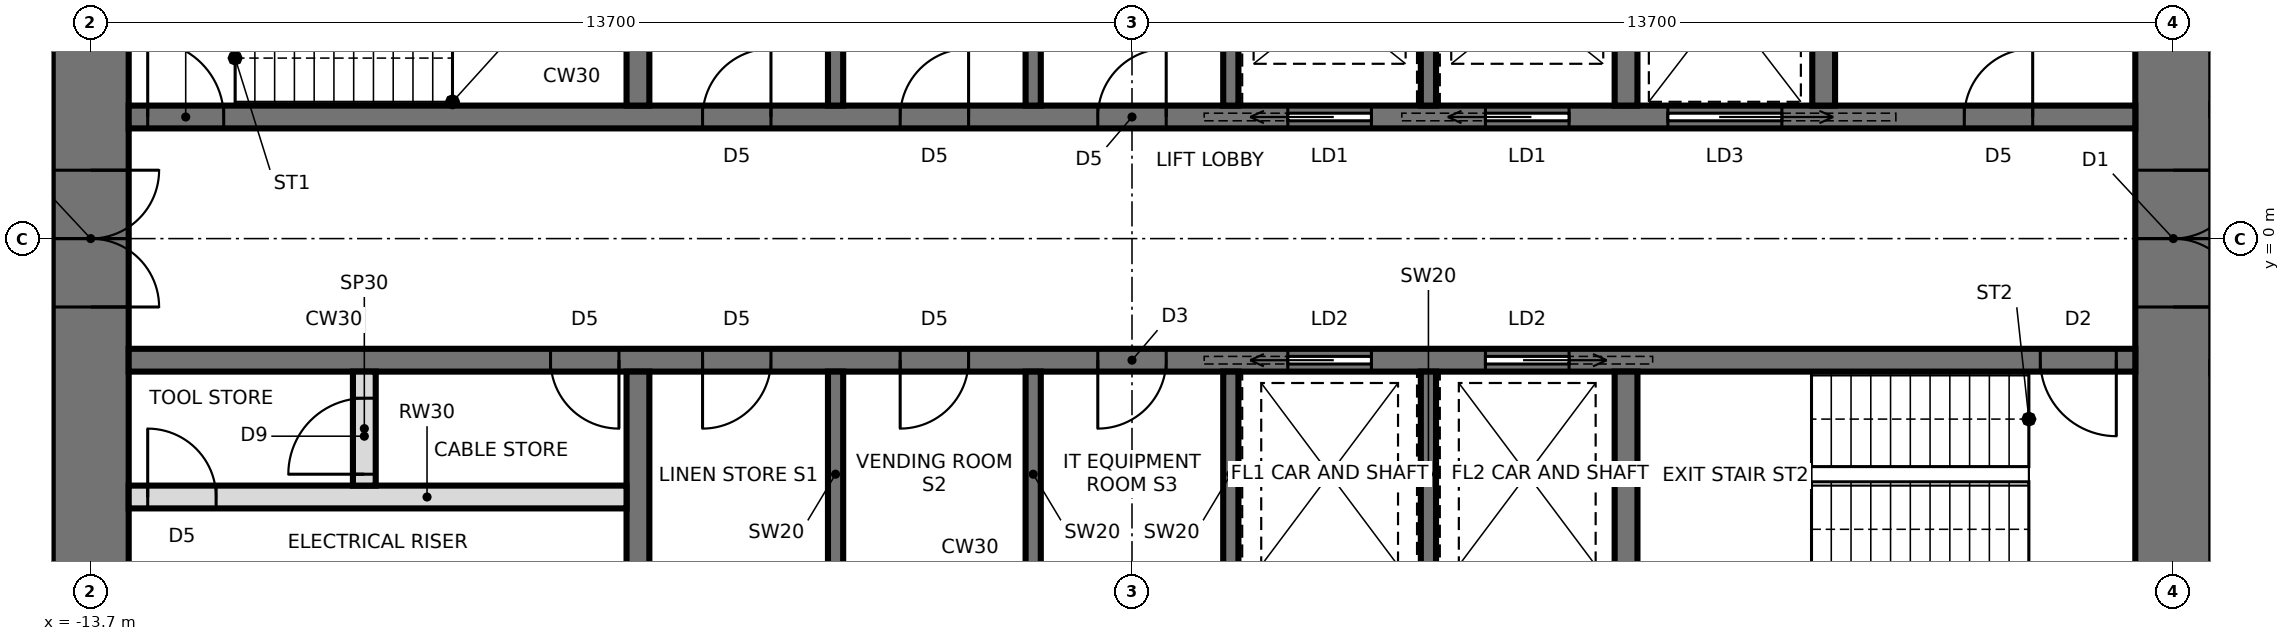
"""IFC4 building model, lengths in metres.
Left out: names, types, materials, properties, quantities, classifications, styles, units other than length and angle.
Written with IfcOpenShell. Run it as: python <this file> out.ifc"""

import sys

from ifc_helpers import new_model, si_unit, direction, frame, frame_2d, origin, place, context, subcontext, project, spatial, rectangle, extrude, element, fill, save


model = new_model("IFC4")
c1 = context("Model", 3, precision=1e-05, world=origin(), true_north=direction((0.0, 1.0)))
c2 = subcontext(c1, "Body", "Model", "MODEL_VIEW")
j1 = project(units=[si_unit("LENGTHUNIT", "METRE"), si_unit("PLANEANGLEUNIT", "RADIAN")], contexts=[c1])
p1 = place(None, origin())
s1 = spatial("IfcSite", under=j1, at=p1, CompositionType="ELEMENT")
p2 = place(p1, origin())
s2 = spatial("IfcBuilding", under=s1, at=p2, CompositionType="ELEMENT")
p3 = place(p2, frame((0.0, 0.0, 256.0)))
s3 = spatial("IfcBuildingStorey", under=s2, at=p3, CompositionType="ELEMENT", Elevation=256.0)
p4 = place(p3, frame((13.7, -9.5, 0.0), z_axis=(0.0, 0.0, 1.0), x_axis=(0.0, 1.0, 0.0)))
e1 = element("IfcWall", 1, at=p4, inside=s3, PredefinedType="SHEAR", context=c2, shape_type="SweptSolid", body=[
    extrude(rectangle(XDim=19.0, YDim=1.0, at=frame_2d((9.5, 0.0))), origin(), (0.0, 0.0, 1.0), 4.2),
])
p5 = place(p4, frame((8.6, 0.0, 0.0)))
e2 = element("IfcOpeningElement", 2, at=p5, cuts=e1, PredefinedType="OPENING", context=c2, shape_type="SweptSolid", body=[
    extrude(rectangle(XDim=1.8, YDim=2.4, at=frame_2d((0.9, 1.2))), frame((0.0, 0.51, 0.0), z_axis=(0.0, -1.0, 0.0), x_axis=(1.0, 0.0, 0.0)), (0.0, 0.0, 1.0), 1.02),
])
p6 = place(p3, frame((-13.7, 9.5, 0.0), z_axis=(0.0, 0.0, 1.0), x_axis=(0.0, -1.0, 0.0)))
e3 = element("IfcWall", 3, at=p6, inside=s3, PredefinedType="SHEAR", context=c2, shape_type="SweptSolid", body=[
    extrude(rectangle(XDim=19.0, YDim=1.0, at=frame_2d((9.5, 0.0))), origin(), (0.0, 0.0, 1.0), 4.2),
])
p7 = place(p6, frame((8.6, 0.0, 0.0)))
e4 = element("IfcOpeningElement", 4, at=p7, cuts=e3, PredefinedType="OPENING", context=c2, shape_type="SweptSolid", body=[
    extrude(rectangle(XDim=1.8, YDim=2.4, at=frame_2d((0.9, 1.2))), frame((0.0, 0.51, 0.0), z_axis=(0.0, -1.0, 0.0), x_axis=(1.0, 0.0, 0.0)), (0.0, 0.0, 1.0), 1.02),
])
p8 = place(p3, frame((-13.2, 1.6, 0.0), z_axis=(0.0, 0.0, 1.0), x_axis=(1.0, 0.0, 0.0)))
e5 = element("IfcWall", 5, at=p8, inside=s3, PredefinedType="SHEAR", context=c2, shape_type="SweptSolid", body=[
    extrude(rectangle(XDim=26.4, YDim=0.3, at=frame_2d((13.2, 0.0))), origin(), (0.0, 0.0, 1.0), 4.2),
])
p9 = place(p8, frame((0.25, 0.0, 0.0)))
e6 = element("IfcOpeningElement", 6, at=p9, cuts=e5, PredefinedType="OPENING", context=c2, shape_type="SweptSolid", body=[
    extrude(rectangle(XDim=1.0, YDim=2.1, at=frame_2d((0.5, 1.05))), frame((0.0, 0.16, 0.0), z_axis=(0.0, -1.0, 0.0), x_axis=(1.0, 0.0, 0.0)), (0.0, 0.0, 1.0), 0.32),
])
p10 = place(p8, frame((20.25, 0.0, 0.0)))
e7 = element("IfcOpeningElement", 7, at=p10, cuts=e5, PredefinedType="OPENING", context=c2, shape_type="SweptSolid", body=[
    extrude(rectangle(XDim=1.5, YDim=2.4, at=frame_2d((0.75, 1.2))), frame((0.0, 0.16, 0.0), z_axis=(0.0, -1.0, 0.0), x_axis=(1.0, 0.0, 0.0)), (0.0, 0.0, 1.0), 0.32),
])
p11 = place(p8, frame((7.55, 0.0, 0.0)))
e8 = element("IfcOpeningElement", 8, at=p11, cuts=e5, PredefinedType="OPENING", context=c2, shape_type="SweptSolid", body=[
    extrude(rectangle(XDim=0.9, YDim=2.1, at=frame_2d((0.45, 1.05))), frame((0.0, 0.16, 0.0), z_axis=(0.0, -1.0, 0.0), x_axis=(1.0, 0.0, 0.0)), (0.0, 0.0, 1.0), 0.32),
])
p12 = place(p8, frame((10.15, 0.0, 0.0)))
e9 = element("IfcOpeningElement", 9, at=p12, cuts=e5, PredefinedType="OPENING", context=c2, shape_type="SweptSolid", body=[
    extrude(rectangle(XDim=0.9, YDim=2.1, at=frame_2d((0.45, 1.05))), frame((0.0, 0.16, 0.0), z_axis=(0.0, -1.0, 0.0), x_axis=(1.0, 0.0, 0.0)), (0.0, 0.0, 1.0), 0.32),
])
p13 = place(p8, frame((12.75, 0.0, 0.0)))
e10 = element("IfcOpeningElement", 10, at=p13, cuts=e5, PredefinedType="OPENING", context=c2, shape_type="SweptSolid", body=[
    extrude(rectangle(XDim=0.9, YDim=2.1, at=frame_2d((0.45, 1.05))), frame((0.0, 0.16, 0.0), z_axis=(0.0, -1.0, 0.0), x_axis=(1.0, 0.0, 0.0)), (0.0, 0.0, 1.0), 0.32),
])
p14 = place(p8, frame((15.25, 0.0, 0.0)))
e11 = element("IfcOpeningElement", 11, at=p14, cuts=e5, PredefinedType="OPENING", context=c2, shape_type="SweptSolid", body=[
    extrude(rectangle(XDim=1.1, YDim=2.3, at=frame_2d((0.55, 1.15))), frame((0.0, 0.16, 0.0), z_axis=(0.0, -1.0, 0.0), x_axis=(1.0, 0.0, 0.0)), (0.0, 0.0, 1.0), 0.32),
])
p15 = place(p8, frame((17.85, 0.0, 0.0)))
e12 = element("IfcOpeningElement", 12, at=p15, cuts=e5, PredefinedType="OPENING", context=c2, shape_type="SweptSolid", body=[
    extrude(rectangle(XDim=1.1, YDim=2.3, at=frame_2d((0.55, 1.15))), frame((0.0, 0.16, 0.0), z_axis=(0.0, -1.0, 0.0), x_axis=(1.0, 0.0, 0.0)), (0.0, 0.0, 1.0), 0.32),
])
p16 = place(p8, frame((24.15, 0.0, 0.0)))
e13 = element("IfcOpeningElement", 13, at=p16, cuts=e5, PredefinedType="OPENING", context=c2, shape_type="SweptSolid", body=[
    extrude(rectangle(XDim=0.9, YDim=2.1, at=frame_2d((0.45, 1.05))), frame((0.0, 0.16, 0.0), z_axis=(0.0, -1.0, 0.0), x_axis=(1.0, 0.0, 0.0)), (0.0, 0.0, 1.0), 0.32),
])
p17 = place(p3, frame((-13.2, -1.6, 0.0), z_axis=(0.0, 0.0, 1.0), x_axis=(1.0, 0.0, 0.0)))
e14 = element("IfcWall", 14, at=p17, inside=s3, PredefinedType="SHEAR", context=c2, shape_type="SweptSolid", body=[
    extrude(rectangle(XDim=26.4, YDim=0.3, at=frame_2d((13.2, 0.0))), origin(), (0.0, 0.0, 1.0), 4.2),
])
p18 = place(p17, frame((25.15, 0.0, 0.0)))
e15 = element("IfcOpeningElement", 15, at=p18, cuts=e14, PredefinedType="OPENING", context=c2, shape_type="SweptSolid", body=[
    extrude(rectangle(XDim=1.0, YDim=2.1, at=frame_2d((0.5, 1.05))), frame((0.0, 0.16, 0.0), z_axis=(0.0, -1.0, 0.0), x_axis=(1.0, 0.0, 0.0)), (0.0, 0.0, 1.0), 0.32),
])
p19 = place(p17, frame((7.55, 0.0, 0.0)))
e16 = element("IfcOpeningElement", 16, at=p19, cuts=e14, PredefinedType="OPENING", context=c2, shape_type="SweptSolid", body=[
    extrude(rectangle(XDim=0.9, YDim=2.1, at=frame_2d((0.45, 1.05))), frame((0.0, 0.16, 0.0), z_axis=(0.0, -1.0, 0.0), x_axis=(1.0, 0.0, 0.0)), (0.0, 0.0, 1.0), 0.32),
])
p20 = place(p17, frame((10.15, 0.0, 0.0)))
e17 = element("IfcOpeningElement", 17, at=p20, cuts=e14, PredefinedType="OPENING", context=c2, shape_type="SweptSolid", body=[
    extrude(rectangle(XDim=0.9, YDim=2.1, at=frame_2d((0.45, 1.05))), frame((0.0, 0.16, 0.0), z_axis=(0.0, -1.0, 0.0), x_axis=(1.0, 0.0, 0.0)), (0.0, 0.0, 1.0), 0.32),
])
p21 = place(p17, frame((12.75, 0.0, 0.0)))
e18 = element("IfcOpeningElement", 18, at=p21, cuts=e14, PredefinedType="OPENING", context=c2, shape_type="SweptSolid", body=[
    extrude(rectangle(XDim=0.9, YDim=2.1, at=frame_2d((0.45, 1.05))), frame((0.0, 0.16, 0.0), z_axis=(0.0, -1.0, 0.0), x_axis=(1.0, 0.0, 0.0)), (0.0, 0.0, 1.0), 0.32),
])
p22 = place(p17, frame((15.25, 0.0, 0.0)))
e19 = element("IfcOpeningElement", 19, at=p22, cuts=e14, PredefinedType="OPENING", context=c2, shape_type="SweptSolid", body=[
    extrude(rectangle(XDim=1.1, YDim=2.3, at=frame_2d((0.55, 1.15))), frame((0.0, 0.16, 0.0), z_axis=(0.0, -1.0, 0.0), x_axis=(1.0, 0.0, 0.0)), (0.0, 0.0, 1.0), 0.32),
])
p23 = place(p17, frame((17.85, 0.0, 0.0)))
e20 = element("IfcOpeningElement", 20, at=p23, cuts=e14, PredefinedType="OPENING", context=c2, shape_type="SweptSolid", body=[
    extrude(rectangle(XDim=1.1, YDim=2.3, at=frame_2d((0.55, 1.15))), frame((0.0, 0.16, 0.0), z_axis=(0.0, -1.0, 0.0), x_axis=(1.0, 0.0, 0.0)), (0.0, 0.0, 1.0), 0.32),
])
p24 = place(p17, frame((5.55, 0.0, 0.0)))
e21 = element("IfcOpeningElement", 21, at=p24, cuts=e14, PredefinedType="OPENING", context=c2, shape_type="SweptSolid", body=[
    extrude(rectangle(XDim=0.9, YDim=2.1, at=frame_2d((0.45, 1.05))), frame((0.0, 0.16, 0.0), z_axis=(0.0, -1.0, 0.0), x_axis=(1.0, 0.0, 0.0)), (0.0, 0.0, 1.0), 0.32),
])
for number, where, z_axis, x_axis in (
    (22, (-6.5, 1.75, 0.0), (0.0, 0.0, 1.0), (0.0, 1.0, 0.0)),
    (23, (6.5, 1.75, 0.0), (0.0, 0.0, 1.0), (0.0, 1.0, 0.0)),
):
    element("IfcWall", number, at=place(p3, frame(where, z_axis=z_axis, x_axis=x_axis)), inside=s3, PredefinedType="SHEAR", context=c2, shape_type="SweptSolid", body=[
        extrude(rectangle(XDim=2.7, YDim=0.3, at=frame_2d((1.35, 0.0))), origin(), (0.0, 0.0, 1.0), 4.2),
    ])
for number, where, z_axis, x_axis in (
    (24, (-3.9, 1.75, 0.0), (0.0, 0.0, 1.0), (0.0, 1.0, 0.0)),
    (25, (-1.3, 1.75, 0.0), (0.0, 0.0, 1.0), (0.0, 1.0, 0.0)),
    (26, (1.3, 1.75, 0.0), (0.0, 0.0, 1.0), (0.0, 1.0, 0.0)),
    (27, (3.9, 1.75, 0.0), (0.0, 0.0, 1.0), (0.0, 1.0, 0.0)),
):
    element("IfcWall", number, at=place(p3, frame(where, z_axis=z_axis, x_axis=x_axis)), inside=s3, PredefinedType="SHEAR", context=c2, shape_type="SweptSolid", body=[
        extrude(rectangle(XDim=2.7, YDim=0.2, at=frame_2d((1.35, 0.0))), origin(), (0.0, 0.0, 1.0), 4.2),
    ])
for number, where, z_axis, x_axis in (
    (28, (-6.5, -1.75, 0.0), (0.0, 0.0, 1.0), (0.0, -1.0, 0.0)),
    (29, (6.5, -1.75, 0.0), (0.0, 0.0, 1.0), (0.0, -1.0, 0.0)),
):
    element("IfcWall", number, at=place(p3, frame(where, z_axis=z_axis, x_axis=x_axis)), inside=s3, PredefinedType="SHEAR", context=c2, shape_type="SweptSolid", body=[
        extrude(rectangle(XDim=2.7, YDim=0.3, at=frame_2d((1.35, 0.0))), origin(), (0.0, 0.0, 1.0), 4.2),
    ])
for number, where, z_axis, x_axis in (
    (30, (-3.9, -1.75, 0.0), (0.0, 0.0, 1.0), (0.0, -1.0, 0.0)),
    (31, (-1.3, -1.75, 0.0), (0.0, 0.0, 1.0), (0.0, -1.0, 0.0)),
    (32, (1.3, -1.75, 0.0), (0.0, 0.0, 1.0), (0.0, -1.0, 0.0)),
    (33, (3.9, -1.75, 0.0), (0.0, 0.0, 1.0), (0.0, -1.0, 0.0)),
):
    element("IfcWall", number, at=place(p3, frame(where, z_axis=z_axis, x_axis=x_axis)), inside=s3, PredefinedType="SHEAR", context=c2, shape_type="SweptSolid", body=[
        extrude(rectangle(XDim=2.7, YDim=0.2, at=frame_2d((1.35, 0.0))), origin(), (0.0, 0.0, 1.0), 4.2),
    ])
p25 = place(p3, frame((9.1, 1.75, 0.0), z_axis=(0.0, 0.0, 1.0), x_axis=(0.0, 1.0, 0.0)))
e34 = element("IfcWall", 34, at=p25, inside=s3, PredefinedType="SHEAR", context=c2, shape_type="SweptSolid", body=[
    extrude(rectangle(XDim=2.7, YDim=0.3, at=frame_2d((1.35, 0.0))), origin(), (0.0, 0.0, 1.0), 4.2),
])
p26 = place(p3, frame((-13.2, -3.4, 0.0), z_axis=(0.0, 0.0, 1.0), x_axis=(1.0, 0.0, 0.0)))
e35 = element("IfcWall", 35, at=p26, inside=s3, PredefinedType="SOLIDWALL", context=c2, shape_type="SweptSolid", body=[
    extrude(rectangle(XDim=6.55, YDim=0.3, at=frame_2d((3.275, 0.0))), origin(), (0.0, 0.0, 1.0), 4.04),
])
p27 = place(p26, frame((0.25, 0.0, 0.0)))
e36 = element("IfcOpeningElement", 36, at=p27, cuts=e35, PredefinedType="OPENING", context=c2, shape_type="SweptSolid", body=[
    extrude(rectangle(XDim=0.9, YDim=2.1, at=frame_2d((0.45, 1.05))), frame((0.0, 0.16, 0.0), z_axis=(0.0, -1.0, 0.0), x_axis=(1.0, 0.0, 0.0)), (0.0, 0.0, 1.0), 0.32),
])
p28 = place(p3, frame((-10.1, -3.25, 0.0), z_axis=(0.0, 0.0, 1.0), x_axis=(0.0, 1.0, 0.0)))
e37 = element("IfcWall", 37, at=p28, inside=s3, PredefinedType="PARTITIONING", context=c2, shape_type="SweptSolid", body=[
    extrude(rectangle(XDim=1.5, YDim=0.3, at=frame_2d((0.75, 0.0))), origin(), (0.0, 0.0, 1.0), 4.04),
])
p29 = place(p28, frame((0.15, 0.0, 0.0)))
e38 = element("IfcOpeningElement", 38, at=p29, cuts=e37, PredefinedType="OPENING", context=c2, shape_type="SweptSolid", body=[
    extrude(rectangle(XDim=1.0, YDim=2.4, at=frame_2d((0.5, 1.2))), frame((0.0, 0.16, 0.0), z_axis=(0.0, -1.0, 0.0), x_axis=(1.0, 0.0, 0.0)), (0.0, 0.0, 1.0), 0.32),
])
p30 = place(p3, frame((19.6, 1.7, 0.0), z_axis=(0.0, 0.0, 1.0), x_axis=(-1.0, 0.0, 0.0)))
e39 = element("IfcWall", 39, at=p30, inside=s3, PredefinedType="PARTITIONING", context=c2, shape_type="SweptSolid", body=[
    extrude(rectangle(XDim=5.4, YDim=0.15, at=frame_2d((2.7, 0.0))), origin(), (0.0, 0.0, 1.0), 4.04),
])
p31 = place(p7, origin())
e40 = element("IfcDoor", 40, at=p31, inside=s3, OperationType="DOUBLE_DOOR_SINGLE_SWING", PredefinedType="DOOR", context=c2, shape_type="SweptSolid", body=[
    extrude(rectangle(XDim=1.72, YDim=2.36, at=frame_2d((0.9, 1.18))), frame((0.0, 0.025, 0.0), z_axis=(0.0, -1.0, 0.0), x_axis=(1.0, 0.0, 0.0)), (0.0, 0.0, 1.0), 0.05),
    extrude(rectangle(XDim=0.04, YDim=2.4, at=frame_2d((0.02, 1.2))), frame((0.0, 0.25, 0.0), z_axis=(0.0, -1.0, 0.0), x_axis=(1.0, 0.0, 0.0)), (0.0, 0.0, 1.0), 0.5),
    extrude(rectangle(XDim=0.04, YDim=2.4, at=frame_2d((1.78, 1.2))), frame((0.0, 0.25, 0.0), z_axis=(0.0, -1.0, 0.0), x_axis=(1.0, 0.0, 0.0)), (0.0, 0.0, 1.0), 0.5),
    extrude(rectangle(XDim=1.72, YDim=0.04, at=frame_2d((0.9, 2.38))), frame((0.0, 0.25, 0.0), z_axis=(0.0, -1.0, 0.0), x_axis=(1.0, 0.0, 0.0)), (0.0, 0.0, 1.0), 0.5),
])
fill(e4, e40)
p32 = place(p5, frame((1.8, 0.0, 0.0), z_axis=(0.0, 0.0, 1.0), x_axis=(-1.0, 0.0, 0.0)))
e41 = element("IfcDoor", 41, at=p32, inside=s3, OperationType="DOUBLE_DOOR_SINGLE_SWING", PredefinedType="DOOR", context=c2, shape_type="SweptSolid", body=[
    extrude(rectangle(XDim=1.72, YDim=2.36, at=frame_2d((0.9, 1.18))), frame((0.0, 0.025, 0.0), z_axis=(0.0, -1.0, 0.0), x_axis=(1.0, 0.0, 0.0)), (0.0, 0.0, 1.0), 0.05),
    extrude(rectangle(XDim=0.04, YDim=2.4, at=frame_2d((1.78, 1.2))), frame((0.0, 0.25, 0.0), z_axis=(0.0, -1.0, 0.0), x_axis=(1.0, 0.0, 0.0)), (0.0, 0.0, 1.0), 0.5),
    extrude(rectangle(XDim=0.04, YDim=2.4, at=frame_2d((0.02, 1.2))), frame((0.0, 0.25, 0.0), z_axis=(0.0, -1.0, 0.0), x_axis=(1.0, 0.0, 0.0)), (0.0, 0.0, 1.0), 0.5),
    extrude(rectangle(XDim=1.72, YDim=0.04, at=frame_2d((0.9, 2.38))), frame((0.0, 0.25, 0.0), z_axis=(0.0, -1.0, 0.0), x_axis=(1.0, 0.0, 0.0)), (0.0, 0.0, 1.0), 0.5),
])
fill(e2, e41)
p33 = place(p9, origin())
e42 = element("IfcDoor", 42, at=p33, inside=s3, OperationType="SINGLE_SWING_LEFT", PredefinedType="DOOR", context=c2, shape_type="SweptSolid", body=[
    extrude(rectangle(XDim=1.0, YDim=2.1, at=frame_2d((0.5, 1.05))), frame((0.0, 0.025, 0.0), z_axis=(0.0, -1.0, 0.0), x_axis=(1.0, 0.0, 0.0)), (0.0, 0.0, 1.0), 0.05),
])
fill(e6, e42)
p34 = place(p18, frame((1.0, 0.0, 0.0), z_axis=(0.0, 0.0, 1.0), x_axis=(-1.0, 0.0, 0.0)))
e43 = element("IfcDoor", 43, at=p34, inside=s3, OperationType="SINGLE_SWING_LEFT", PredefinedType="DOOR", context=c2, shape_type="SweptSolid", body=[
    extrude(rectangle(XDim=1.0, YDim=2.1, at=frame_2d((0.5, 1.05))), frame((0.0, 0.025, 0.0), z_axis=(0.0, -1.0, 0.0), x_axis=(1.0, 0.0, 0.0)), (0.0, 0.0, 1.0), 0.05),
])
fill(e15, e43)
p35 = place(p10, origin())
e44 = element("IfcDoor", 44, at=p35, inside=s3, OperationType="SLIDING_TO_RIGHT", PredefinedType="DOOR", context=c2, shape_type="SweptSolid", body=[
    extrude(rectangle(XDim=1.5, YDim=2.4, at=frame_2d((0.75, 1.2))), frame((0.0, 0.025, 0.0), z_axis=(0.0, -1.0, 0.0), x_axis=(1.0, 0.0, 0.0)), (0.0, 0.0, 1.0), 0.05),
])
fill(e7, e44)
p36 = place(p11, origin())
e45 = element("IfcDoor", 45, at=p36, inside=s3, OperationType="SINGLE_SWING_RIGHT", PredefinedType="DOOR", context=c2, shape_type="SweptSolid", body=[
    extrude(rectangle(XDim=0.9, YDim=2.1, at=frame_2d((0.45, 1.05))), frame((0.0, 0.025, 0.0), z_axis=(0.0, -1.0, 0.0), x_axis=(1.0, 0.0, 0.0)), (0.0, 0.0, 1.0), 0.05),
])
fill(e8, e45)
p37 = place(p12, origin())
e46 = element("IfcDoor", 46, at=p37, inside=s3, OperationType="SINGLE_SWING_RIGHT", PredefinedType="DOOR", context=c2, shape_type="SweptSolid", body=[
    extrude(rectangle(XDim=0.9, YDim=2.1, at=frame_2d((0.45, 1.05))), frame((0.0, 0.025, 0.0), z_axis=(0.0, -1.0, 0.0), x_axis=(1.0, 0.0, 0.0)), (0.0, 0.0, 1.0), 0.05),
])
fill(e9, e46)
p38 = place(p13, origin())
e47 = element("IfcDoor", 47, at=p38, inside=s3, OperationType="SINGLE_SWING_RIGHT", PredefinedType="DOOR", context=c2, shape_type="SweptSolid", body=[
    extrude(rectangle(XDim=0.9, YDim=2.1, at=frame_2d((0.45, 1.05))), frame((0.0, 0.025, 0.0), z_axis=(0.0, -1.0, 0.0), x_axis=(1.0, 0.0, 0.0)), (0.0, 0.0, 1.0), 0.05),
])
fill(e10, e47)
p39 = place(p14, origin())
e48 = element("IfcDoor", 48, at=p39, inside=s3, OperationType="SLIDING_TO_LEFT", PredefinedType="DOOR", context=c2, shape_type="SweptSolid", body=[
    extrude(rectangle(XDim=1.1, YDim=2.3, at=frame_2d((0.55, 1.15))), frame((0.0, 0.025, 0.0), z_axis=(0.0, -1.0, 0.0), x_axis=(1.0, 0.0, 0.0)), (0.0, 0.0, 1.0), 0.05),
])
fill(e11, e48)
p40 = place(p15, origin())
e49 = element("IfcDoor", 49, at=p40, inside=s3, OperationType="SLIDING_TO_LEFT", PredefinedType="DOOR", context=c2, shape_type="SweptSolid", body=[
    extrude(rectangle(XDim=1.1, YDim=2.3, at=frame_2d((0.55, 1.15))), frame((0.0, 0.025, 0.0), z_axis=(0.0, -1.0, 0.0), x_axis=(1.0, 0.0, 0.0)), (0.0, 0.0, 1.0), 0.05),
])
fill(e12, e49)
p41 = place(p19, frame((0.9, 0.0, 0.0), z_axis=(0.0, 0.0, 1.0), x_axis=(-1.0, 0.0, 0.0)))
e50 = element("IfcDoor", 50, at=p41, inside=s3, OperationType="SINGLE_SWING_RIGHT", PredefinedType="DOOR", context=c2, shape_type="SweptSolid", body=[
    extrude(rectangle(XDim=0.9, YDim=2.1, at=frame_2d((0.45, 1.05))), frame((0.0, 0.025, 0.0), z_axis=(0.0, -1.0, 0.0), x_axis=(1.0, 0.0, 0.0)), (0.0, 0.0, 1.0), 0.05),
])
fill(e16, e50)
p42 = place(p20, frame((0.9, 0.0, 0.0), z_axis=(0.0, 0.0, 1.0), x_axis=(-1.0, 0.0, 0.0)))
e51 = element("IfcDoor", 51, at=p42, inside=s3, OperationType="SINGLE_SWING_RIGHT", PredefinedType="DOOR", context=c2, shape_type="SweptSolid", body=[
    extrude(rectangle(XDim=0.9, YDim=2.1, at=frame_2d((0.45, 1.05))), frame((0.0, 0.025, 0.0), z_axis=(0.0, -1.0, 0.0), x_axis=(1.0, 0.0, 0.0)), (0.0, 0.0, 1.0), 0.05),
])
fill(e17, e51)
p43 = place(p21, frame((0.9, 0.0, 0.0), z_axis=(0.0, 0.0, 1.0), x_axis=(-1.0, 0.0, 0.0)))
e52 = element("IfcDoor", 52, at=p43, inside=s3, OperationType="SINGLE_SWING_RIGHT", PredefinedType="DOOR", context=c2, shape_type="SweptSolid", body=[
    extrude(rectangle(XDim=0.9, YDim=2.1, at=frame_2d((0.45, 1.05))), frame((0.0, 0.025, 0.0), z_axis=(0.0, -1.0, 0.0), x_axis=(1.0, 0.0, 0.0)), (0.0, 0.0, 1.0), 0.05),
])
fill(e18, e52)
p44 = place(p22, frame((1.1, 0.0, 0.0), z_axis=(0.0, 0.0, 1.0), x_axis=(-1.0, 0.0, 0.0)))
e53 = element("IfcDoor", 53, at=p44, inside=s3, OperationType="SLIDING_TO_RIGHT", PredefinedType="DOOR", context=c2, shape_type="SweptSolid", body=[
    extrude(rectangle(XDim=1.1, YDim=2.3, at=frame_2d((0.55, 1.15))), frame((0.0, 0.025, 0.0), z_axis=(0.0, -1.0, 0.0), x_axis=(1.0, 0.0, 0.0)), (0.0, 0.0, 1.0), 0.05),
])
fill(e19, e53)
p45 = place(p23, frame((1.1, 0.0, 0.0), z_axis=(0.0, 0.0, 1.0), x_axis=(-1.0, 0.0, 0.0)))
e54 = element("IfcDoor", 54, at=p45, inside=s3, OperationType="SLIDING_TO_LEFT", PredefinedType="DOOR", context=c2, shape_type="SweptSolid", body=[
    extrude(rectangle(XDim=1.1, YDim=2.3, at=frame_2d((0.55, 1.15))), frame((0.0, 0.025, 0.0), z_axis=(0.0, -1.0, 0.0), x_axis=(1.0, 0.0, 0.0)), (0.0, 0.0, 1.0), 0.05),
])
fill(e20, e54)
p46 = place(p16, origin())
e55 = element("IfcDoor", 55, at=p46, inside=s3, OperationType="SINGLE_SWING_RIGHT", PredefinedType="DOOR", context=c2, shape_type="SweptSolid", body=[
    extrude(rectangle(XDim=0.9, YDim=2.1, at=frame_2d((0.45, 1.05))), frame((0.0, 0.025, 0.0), z_axis=(0.0, -1.0, 0.0), x_axis=(1.0, 0.0, 0.0)), (0.0, 0.0, 1.0), 0.05),
])
fill(e13, e55)
p47 = place(p24, frame((0.9, 0.0, 0.0), z_axis=(0.0, 0.0, 1.0), x_axis=(-1.0, 0.0, 0.0)))
e56 = element("IfcDoor", 56, at=p47, inside=s3, OperationType="SINGLE_SWING_LEFT", PredefinedType="DOOR", context=c2, shape_type="SweptSolid", body=[
    extrude(rectangle(XDim=0.9, YDim=2.1, at=frame_2d((0.45, 1.05))), frame((0.0, 0.025, 0.0), z_axis=(0.0, -1.0, 0.0), x_axis=(1.0, 0.0, 0.0)), (0.0, 0.0, 1.0), 0.05),
])
fill(e21, e56)
p48 = place(p27, origin())
e57 = element("IfcDoor", 57, at=p48, inside=s3, OperationType="SINGLE_SWING_LEFT", PredefinedType="DOOR", context=c2, shape_type="SweptSolid", body=[
    extrude(rectangle(XDim=0.9, YDim=2.1, at=frame_2d((0.45, 1.05))), frame((0.0, 0.025, 0.0), z_axis=(0.0, -1.0, 0.0), x_axis=(1.0, 0.0, 0.0)), (0.0, 0.0, 1.0), 0.05),
])
fill(e36, e57)
p49 = place(p29, origin())
e58 = element("IfcDoor", 58, at=p49, inside=s3, OperationType="SINGLE_SWING_LEFT", PredefinedType="DOOR", context=c2, shape_type="SweptSolid", body=[
    extrude(rectangle(XDim=1.0, YDim=2.4, at=frame_2d((0.5, 1.2))), frame((0.0, 0.025, 0.0), z_axis=(0.0, -1.0, 0.0), x_axis=(1.0, 0.0, 0.0)), (0.0, 0.0, 1.0), 0.05),
])
fill(e38, e58)
save(model, sys.argv[1])
